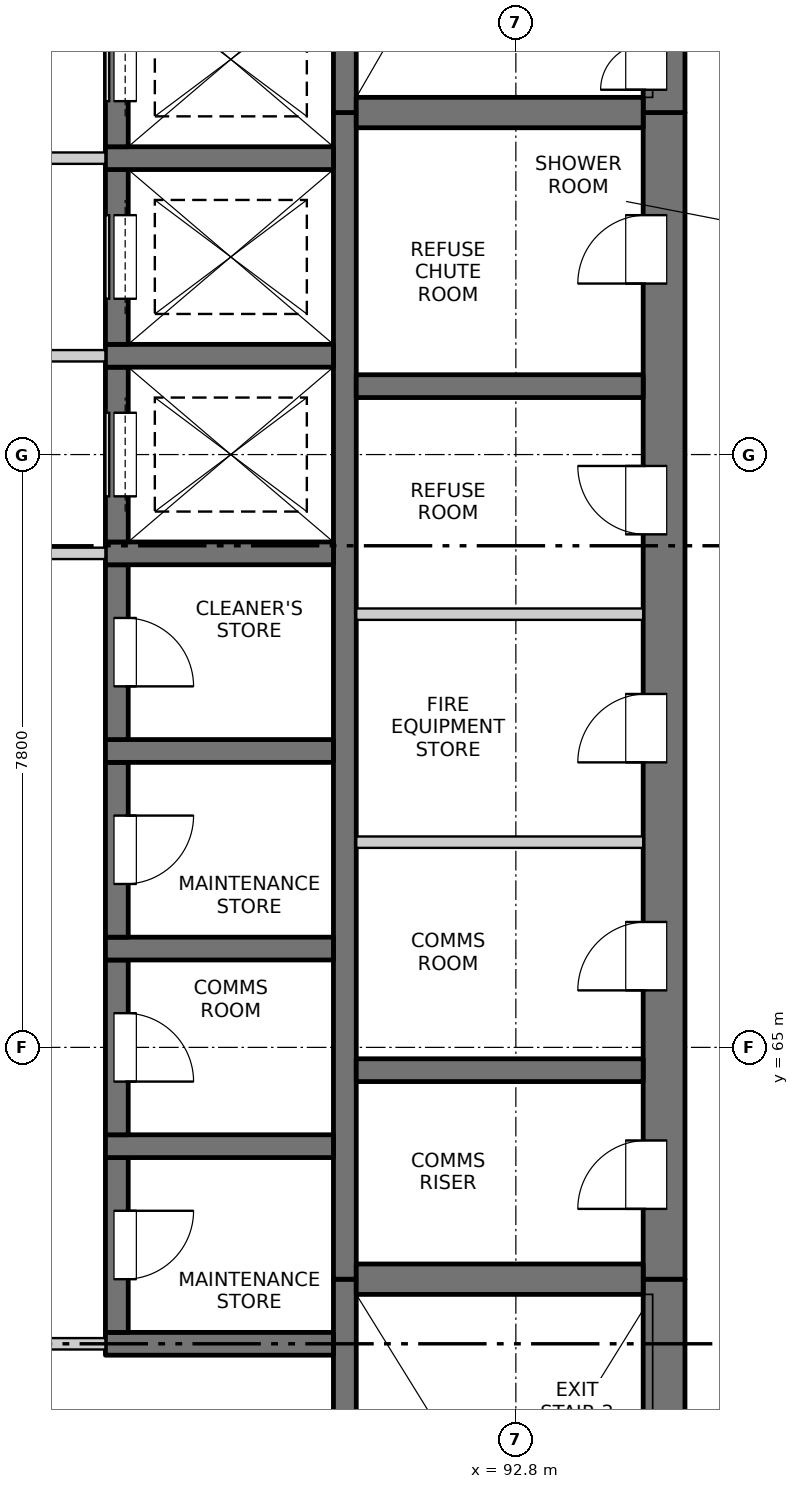
"""IFC4 building model, lengths in metres.
Left out: names, types, materials, properties, quantities, classifications, styles, units other than length and angle.
Written with IfcOpenShell. Run it as: python <this file> out.ifc"""

import sys

from ifc_helpers import new_model, si_unit, direction, frame, frame_2d, origin, place, context, subcontext, project, spatial, rectangle, extrude, element, fill, save


model = new_model("IFC4")
c1 = context("Model", 3, precision=1e-05, world=origin(), true_north=direction((0.0, 1.0)))
c2 = subcontext(c1, "Body", "Model", "MODEL_VIEW")
j1 = project(units=[si_unit("LENGTHUNIT", "METRE"), si_unit("PLANEANGLEUNIT", "RADIAN")], contexts=[c1])
p1 = place(None, origin())
s1 = spatial("IfcSite", under=j1, at=p1, CompositionType="ELEMENT")
p2 = place(p1, origin())
s2 = spatial("IfcBuilding", under=s1, at=p2, CompositionType="ELEMENT")
p3 = place(p2, frame((0.0, 0.0, 140.7)))
s3 = spatial("IfcBuildingStorey", under=s2, at=p3, CompositionType="ELEMENT", Elevation=140.7)
p4 = place(p3, frame((94.75, 54.975, -0.25), z_axis=(0.0, 0.0, 1.0), x_axis=(0.0, 1.0, 0.0)))
e1 = element("IfcWall", 1, at=p4, inside=s3, PredefinedType="SOLIDWALL", context=c2, shape_type="SweptSolid", body=[
    extrude(rectangle(XDim=6.975, YDim=0.55, at=frame_2d((3.487, 0.0))), origin(), (0.0, 0.0, 1.0), 3.35),
])
p5 = place(p4, frame((0.675, 0.0, 0.25)))
e2 = element("IfcOpeningElement", 2, at=p5, cuts=e1, PredefinedType="OPENING", context=c2, shape_type="SweptSolid", body=[
    extrude(rectangle(XDim=1.2, YDim=2.1, at=frame_2d((0.6, 1.05))), frame((0.0, 0.285, 0.0), z_axis=(0.0, -1.0, 0.0), x_axis=(1.0, 0.0, 0.0)), (0.0, 0.0, 1.0), 0.57),
])
p6 = place(p3, frame((94.75, 61.95, -0.25), z_axis=(0.0, 0.0, 1.0), x_axis=(0.0, 1.0, 0.0)))
e3 = element("IfcWall", 3, at=p6, inside=s3, PredefinedType="SOLIDWALL", context=c2, shape_type="SweptSolid", body=[
    extrude(rectangle(XDim=15.35, YDim=0.55, at=frame_2d((7.675, 0.0))), origin(), (0.0, 0.0, 1.0), 3.35),
])
p7 = place(p6, frame((0.925, 0.0, 0.25)))
e4 = element("IfcOpeningElement", 4, at=p7, cuts=e3, PredefinedType="OPENING", context=c2, shape_type="SweptSolid", body=[
    extrude(rectangle(XDim=0.9, YDim=2.1, at=frame_2d((0.45, 1.05))), frame((0.0, 0.285, 0.0), z_axis=(0.0, -1.0, 0.0), x_axis=(1.0, 0.0, 0.0)), (0.0, 0.0, 1.0), 0.57),
])
p8 = place(p6, frame((3.8, 0.0, 0.25)))
e5 = element("IfcOpeningElement", 5, at=p8, cuts=e3, PredefinedType="OPENING", context=c2, shape_type="SweptSolid", body=[
    extrude(rectangle(XDim=0.9, YDim=2.1, at=frame_2d((0.45, 1.05))), frame((0.0, 0.285, 0.0), z_axis=(0.0, -1.0, 0.0), x_axis=(1.0, 0.0, 0.0)), (0.0, 0.0, 1.0), 0.57),
])
p9 = place(p6, frame((6.8, 0.0, 0.25)))
e6 = element("IfcOpeningElement", 6, at=p9, cuts=e3, PredefinedType="OPENING", context=c2, shape_type="SweptSolid", body=[
    extrude(rectangle(XDim=0.9, YDim=2.1, at=frame_2d((0.45, 1.05))), frame((0.0, 0.285, 0.0), z_axis=(0.0, -1.0, 0.0), x_axis=(1.0, 0.0, 0.0)), (0.0, 0.0, 1.0), 0.57),
])
p10 = place(p6, frame((9.8, 0.0, 0.25)))
e7 = element("IfcOpeningElement", 7, at=p10, cuts=e3, PredefinedType="OPENING", context=c2, shape_type="SweptSolid", body=[
    extrude(rectangle(XDim=0.9, YDim=2.1, at=frame_2d((0.45, 1.05))), frame((0.0, 0.285, 0.0), z_axis=(0.0, -1.0, 0.0), x_axis=(1.0, 0.0, 0.0)), (0.0, 0.0, 1.0), 0.57),
])
p11 = place(p6, frame((13.1, 0.0, 0.25)))
e8 = element("IfcOpeningElement", 8, at=p11, cuts=e3, PredefinedType="OPENING", context=c2, shape_type="SweptSolid", body=[
    extrude(rectangle(XDim=0.9, YDim=2.1, at=frame_2d((0.45, 1.05))), frame((0.0, 0.285, 0.0), z_axis=(0.0, -1.0, 0.0), x_axis=(1.0, 0.0, 0.0)), (0.0, 0.0, 1.0), 0.57),
])
p12 = place(p3, frame((94.75, 77.3, -0.25), z_axis=(0.0, 0.0, 1.0), x_axis=(0.0, 1.0, 0.0)))
e9 = element("IfcWall", 9, at=p12, inside=s3, PredefinedType="SOLIDWALL", context=c2, shape_type="SweptSolid", body=[
    extrude(rectangle(XDim=7.475, YDim=0.55, at=frame_2d((3.737, 0.0))), origin(), (0.0, 0.0, 1.0), 3.35),
])
p13 = place(p12, frame((0.3, 0.0, 0.25)))
e10 = element("IfcOpeningElement", 10, at=p13, cuts=e9, PredefinedType="OPENING", context=c2, shape_type="SweptSolid", body=[
    extrude(rectangle(XDim=1.2, YDim=2.1, at=frame_2d((0.6, 1.05))), frame((0.0, 0.285, 0.0), z_axis=(0.0, -1.0, 0.0), x_axis=(1.0, 0.0, 0.0)), (0.0, 0.0, 1.0), 0.57),
])
p14 = place(p3, frame((90.55, 55.525, -0.25), z_axis=(0.0, 0.0, 1.0), x_axis=(0.0, 1.0, 0.0)))
e11 = element("IfcWall", 11, at=p14, inside=s3, PredefinedType="SOLIDWALL", context=c2, shape_type="SweptSolid", body=[
    extrude(rectangle(XDim=6.425, YDim=0.3, at=frame_2d((3.212, 0.0))), origin(), (0.0, 0.0, 1.0), 3.35),
])
p15 = place(p3, frame((90.55, 61.95, -0.25), z_axis=(0.0, 0.0, 1.0), x_axis=(0.0, 1.0, 0.0)))
e12 = element("IfcWall", 12, at=p15, inside=s3, PredefinedType="SOLIDWALL", context=c2, shape_type="SweptSolid", body=[
    extrude(rectangle(XDim=15.35, YDim=0.3, at=frame_2d((7.675, 0.0))), origin(), (0.0, 0.0, 1.0), 3.35),
])
p16 = place(p3, frame((90.55, 77.3, -0.25), z_axis=(0.0, 0.0, 1.0), x_axis=(0.0, 1.0, 0.0)))
e13 = element("IfcWall", 13, at=p16, inside=s3, PredefinedType="SOLIDWALL", context=c2, shape_type="SweptSolid", body=[
    extrude(rectangle(XDim=6.925, YDim=0.3, at=frame_2d((3.462, 0.0))), origin(), (0.0, 0.0, 1.0), 3.35),
])
p17 = place(p3, frame((87.4, 61.1, -0.25), z_axis=(0.0, 0.0, 1.0), x_axis=(1.0, 0.0, 0.0)))
e14 = element("IfcWall", 14, at=p17, inside=s3, PredefinedType="SOLIDWALL", context=c2, shape_type="SweptSolid", body=[
    extrude(rectangle(XDim=3.0, YDim=0.3, at=frame_2d((1.5, 0.0))), origin(), (0.0, 0.0, 1.0), 3.35),
])
p18 = place(p3, frame((87.55, 61.25, -0.25), z_axis=(0.0, 0.0, 1.0), x_axis=(0.0, 1.0, 0.0)))
e15 = element("IfcWall", 15, at=p18, inside=s3, PredefinedType="SOLIDWALL", context=c2, shape_type="SweptSolid", body=[
    extrude(rectangle(XDim=2.3, YDim=0.3, at=frame_2d((1.15, 0.0))), origin(), (0.0, 0.0, 1.0), 3.35),
])
p19 = place(p18, frame((0.7, 0.0, 0.25)))
e16 = element("IfcOpeningElement", 16, at=p19, cuts=e15, PredefinedType="OPENING", context=c2, shape_type="SweptSolid", body=[
    extrude(rectangle(XDim=0.9, YDim=2.1, at=frame_2d((0.45, 1.05))), frame((0.0, 0.16, 0.0), z_axis=(0.0, -1.0, 0.0), x_axis=(1.0, 0.0, 0.0)), (0.0, 0.0, 1.0), 0.32),
])
p20 = place(p3, frame((87.4, 63.7, -0.25), z_axis=(0.0, 0.0, 1.0), x_axis=(1.0, 0.0, 0.0)))
e17 = element("IfcWall", 17, at=p20, inside=s3, PredefinedType="SOLIDWALL", context=c2, shape_type="SweptSolid", body=[
    extrude(rectangle(XDim=3.0, YDim=0.3, at=frame_2d((1.5, 0.0))), origin(), (0.0, 0.0, 1.0), 3.35),
])
p21 = place(p3, frame((87.55, 63.85, -0.25), z_axis=(0.0, 0.0, 1.0), x_axis=(0.0, 1.0, 0.0)))
e18 = element("IfcWall", 18, at=p21, inside=s3, PredefinedType="SOLIDWALL", context=c2, shape_type="SweptSolid", body=[
    extrude(rectangle(XDim=2.3, YDim=0.3, at=frame_2d((1.15, 0.0))), origin(), (0.0, 0.0, 1.0), 3.35),
])
p22 = place(p21, frame((0.7, 0.0, 0.25)))
e19 = element("IfcOpeningElement", 19, at=p22, cuts=e18, PredefinedType="OPENING", context=c2, shape_type="SweptSolid", body=[
    extrude(rectangle(XDim=0.9, YDim=2.1, at=frame_2d((0.45, 1.05))), frame((0.0, 0.16, 0.0), z_axis=(0.0, -1.0, 0.0), x_axis=(1.0, 0.0, 0.0)), (0.0, 0.0, 1.0), 0.32),
])
p23 = place(p3, frame((87.4, 66.3, -0.25), z_axis=(0.0, 0.0, 1.0), x_axis=(1.0, 0.0, 0.0)))
e20 = element("IfcWall", 20, at=p23, inside=s3, PredefinedType="SOLIDWALL", context=c2, shape_type="SweptSolid", body=[
    extrude(rectangle(XDim=3.0, YDim=0.3, at=frame_2d((1.5, 0.0))), origin(), (0.0, 0.0, 1.0), 3.35),
])
p24 = place(p3, frame((87.55, 66.45, -0.25), z_axis=(0.0, 0.0, 1.0), x_axis=(0.0, 1.0, 0.0)))
e21 = element("IfcWall", 21, at=p24, inside=s3, PredefinedType="SOLIDWALL", context=c2, shape_type="SweptSolid", body=[
    extrude(rectangle(XDim=2.3, YDim=0.3, at=frame_2d((1.15, 0.0))), origin(), (0.0, 0.0, 1.0), 3.35),
])
p25 = place(p24, frame((0.7, 0.0, 0.25)))
e22 = element("IfcOpeningElement", 22, at=p25, cuts=e21, PredefinedType="OPENING", context=c2, shape_type="SweptSolid", body=[
    extrude(rectangle(XDim=0.9, YDim=2.1, at=frame_2d((0.45, 1.05))), frame((0.0, 0.16, 0.0), z_axis=(0.0, -1.0, 0.0), x_axis=(1.0, 0.0, 0.0)), (0.0, 0.0, 1.0), 0.32),
])
p26 = place(p3, frame((87.4, 68.9, -0.25), z_axis=(0.0, 0.0, 1.0), x_axis=(1.0, 0.0, 0.0)))
e23 = element("IfcWall", 23, at=p26, inside=s3, PredefinedType="SOLIDWALL", context=c2, shape_type="SweptSolid", body=[
    extrude(rectangle(XDim=3.0, YDim=0.3, at=frame_2d((1.5, 0.0))), origin(), (0.0, 0.0, 1.0), 3.35),
])
p27 = place(p3, frame((87.55, 69.05, -0.25), z_axis=(0.0, 0.0, 1.0), x_axis=(0.0, 1.0, 0.0)))
e24 = element("IfcWall", 24, at=p27, inside=s3, PredefinedType="SOLIDWALL", context=c2, shape_type="SweptSolid", body=[
    extrude(rectangle(XDim=2.3, YDim=0.3, at=frame_2d((1.15, 0.0))), origin(), (0.0, 0.0, 1.0), 3.35),
])
p28 = place(p27, frame((0.7, 0.0, 0.25)))
e25 = element("IfcOpeningElement", 25, at=p28, cuts=e24, PredefinedType="OPENING", context=c2, shape_type="SweptSolid", body=[
    extrude(rectangle(XDim=0.9, YDim=2.1, at=frame_2d((0.45, 1.05))), frame((0.0, 0.16, 0.0), z_axis=(0.0, -1.0, 0.0), x_axis=(1.0, 0.0, 0.0)), (0.0, 0.0, 1.0), 0.32),
])
p29 = place(p3, frame((87.4, 71.5, -0.25), z_axis=(0.0, 0.0, 1.0), x_axis=(1.0, 0.0, 0.0)))
e26 = element("IfcWall", 26, at=p29, inside=s3, PredefinedType="SOLIDWALL", context=c2, shape_type="SweptSolid", body=[
    extrude(rectangle(XDim=3.0, YDim=0.3, at=frame_2d((1.5, 0.0))), origin(), (0.0, 0.0, 1.0), 3.35),
])
p30 = place(p3, frame((87.55, 71.65, -0.25), z_axis=(0.0, 0.0, 1.0), x_axis=(0.0, 1.0, 0.0)))
e27 = element("IfcWall", 27, at=p30, inside=s3, PredefinedType="SOLIDWALL", context=c2, shape_type="SweptSolid", body=[
    extrude(rectangle(XDim=2.3, YDim=0.3, at=frame_2d((1.15, 0.0))), origin(), (0.0, 0.0, 1.0), 3.35),
])
p31 = place(p30, frame((0.6, 0.0, 0.25)))
e28 = element("IfcOpeningElement", 28, at=p31, cuts=e27, PredefinedType="OPENING", context=c2, shape_type="SweptSolid", body=[
    extrude(rectangle(XDim=1.1, YDim=2.1, at=frame_2d((0.55, 1.05))), frame((0.0, 0.16, 0.0), z_axis=(0.0, -1.0, 0.0), x_axis=(1.0, 0.0, 0.0)), (0.0, 0.0, 1.0), 0.32),
])
p32 = place(p3, frame((87.4, 74.1, -0.25), z_axis=(0.0, 0.0, 1.0), x_axis=(1.0, 0.0, 0.0)))
e29 = element("IfcWall", 29, at=p32, inside=s3, PredefinedType="SOLIDWALL", context=c2, shape_type="SweptSolid", body=[
    extrude(rectangle(XDim=3.0, YDim=0.3, at=frame_2d((1.5, 0.0))), origin(), (0.0, 0.0, 1.0), 3.35),
])
p33 = place(p3, frame((87.55, 74.25, -0.25), z_axis=(0.0, 0.0, 1.0), x_axis=(0.0, 1.0, 0.0)))
e30 = element("IfcWall", 30, at=p33, inside=s3, PredefinedType="SOLIDWALL", context=c2, shape_type="SweptSolid", body=[
    extrude(rectangle(XDim=2.3, YDim=0.3, at=frame_2d((1.15, 0.0))), origin(), (0.0, 0.0, 1.0), 3.35),
])
p34 = place(p33, frame((0.6, 0.0, 0.25)))
e31 = element("IfcOpeningElement", 31, at=p34, cuts=e30, PredefinedType="OPENING", context=c2, shape_type="SweptSolid", body=[
    extrude(rectangle(XDim=1.1, YDim=2.1, at=frame_2d((0.55, 1.05))), frame((0.0, 0.16, 0.0), z_axis=(0.0, -1.0, 0.0), x_axis=(1.0, 0.0, 0.0)), (0.0, 0.0, 1.0), 0.32),
])
p35 = place(p3, frame((87.4, 76.7, -0.25), z_axis=(0.0, 0.0, 1.0), x_axis=(1.0, 0.0, 0.0)))
e32 = element("IfcWall", 32, at=p35, inside=s3, PredefinedType="SOLIDWALL", context=c2, shape_type="SweptSolid", body=[
    extrude(rectangle(XDim=3.0, YDim=0.3, at=frame_2d((1.5, 0.0))), origin(), (0.0, 0.0, 1.0), 3.35),
])
p36 = place(p3, frame((87.55, 76.85, -0.25), z_axis=(0.0, 0.0, 1.0), x_axis=(0.0, 1.0, 0.0)))
e33 = element("IfcWall", 33, at=p36, inside=s3, PredefinedType="SOLIDWALL", context=c2, shape_type="SweptSolid", body=[
    extrude(rectangle(XDim=2.3, YDim=0.3, at=frame_2d((1.15, 0.0))), origin(), (0.0, 0.0, 1.0), 3.35),
])
p37 = place(p36, frame((0.6, 0.0, 0.25)))
e34 = element("IfcOpeningElement", 34, at=p37, cuts=e33, PredefinedType="OPENING", context=c2, shape_type="SweptSolid", body=[
    extrude(rectangle(XDim=1.1, YDim=2.1, at=frame_2d((0.55, 1.05))), frame((0.0, 0.16, 0.0), z_axis=(0.0, -1.0, 0.0), x_axis=(1.0, 0.0, 0.0)), (0.0, 0.0, 1.0), 0.32),
])
p38 = place(p3, frame((90.7, 61.95, -0.25), z_axis=(0.0, 0.0, 1.0), x_axis=(1.0, 0.0, 0.0)))
e35 = element("IfcWall", 35, at=p38, inside=s3, PredefinedType="SOLIDWALL", context=c2, shape_type="SweptSolid", body=[
    extrude(rectangle(XDim=3.775, YDim=0.4, at=frame_2d((1.888, 0.0))), origin(), (0.0, 0.0, 1.0), 3.35),
])
for number, where, z_axis, x_axis in (
    (36, (90.7, 64.7, -0.25), (0.0, 0.0, 1.0), (1.0, 0.0, 0.0)),
    (37, (90.7, 73.7, -0.25), (0.0, 0.0, 1.0), (1.0, 0.0, 0.0)),
):
    element("IfcWall", number, at=place(p3, frame(where, z_axis=z_axis, x_axis=x_axis)), inside=s3, PredefinedType="SOLIDWALL", context=c2, shape_type="SweptSolid", body=[
        extrude(rectangle(XDim=3.775, YDim=0.3, at=frame_2d((1.888, 0.0))), origin(), (0.0, 0.0, 1.0), 3.35),
    ])
p39 = place(p3, frame((90.7, 77.3, -0.25), z_axis=(0.0, 0.0, 1.0), x_axis=(1.0, 0.0, 0.0)))
e38 = element("IfcWall", 38, at=p39, inside=s3, PredefinedType="SOLIDWALL", context=c2, shape_type="SweptSolid", body=[
    extrude(rectangle(XDim=3.775, YDim=0.4, at=frame_2d((1.888, 0.0))), origin(), (0.0, 0.0, 1.0), 3.35),
])
p40 = place(p3, frame((82.6, 61.1, 0.0), z_axis=(0.0, 0.0, 1.0), x_axis=(1.0, 0.0, 0.0)))
e39 = element("IfcWall", 39, at=p40, inside=s3, PredefinedType="PARTITIONING", context=c2, shape_type="SweptSolid", body=[
    extrude(rectangle(XDim=4.8, YDim=0.15, at=frame_2d((2.4, 0.0))), origin(), (0.0, 0.0, 1.0), 3.1),
])
p41 = place(p40, frame((1.5, 0.0, 0.0)))
e40 = element("IfcOpeningElement", 40, at=p41, cuts=e39, PredefinedType="OPENING", context=c2, shape_type="SweptSolid", body=[
    extrude(rectangle(XDim=1.8, YDim=2.1, at=frame_2d((0.9, 1.05))), frame((0.0, 0.085, 0.0), z_axis=(0.0, -1.0, 0.0), x_axis=(1.0, 0.0, 0.0)), (0.0, 0.0, 1.0), 0.17),
])
for number, where, z_axis, x_axis in (
    (41, (90.7, 67.7, 0.0), (0.0, 0.0, 1.0), (1.0, 0.0, 0.0)),
    (42, (90.7, 70.7, 0.0), (0.0, 0.0, 1.0), (1.0, 0.0, 0.0)),
):
    element("IfcWall", number, at=place(p3, frame(where, z_axis=z_axis, x_axis=x_axis)), inside=s3, PredefinedType="PARTITIONING", context=c2, shape_type="SweptSolid", body=[
        extrude(rectangle(XDim=3.775, YDim=0.15, at=frame_2d((1.887, 0.0))), origin(), (0.0, 0.0, 1.0), 3.1),
    ])
p42 = place(p3, frame((82.6, 71.5, 0.0), z_axis=(0.0, 0.0, 1.0), x_axis=(1.0, 0.0, 0.0)))
e43 = element("IfcWall", 43, at=p42, inside=s3, PredefinedType="PARTITIONING", context=c2, shape_type="SweptSolid", body=[
    extrude(rectangle(XDim=4.8, YDim=0.15, at=frame_2d((2.4, 0.0))), origin(), (0.0, 0.0, 1.0), 3.1),
])
p43 = place(p42, frame((1.5, 0.0, 0.0)))
e44 = element("IfcOpeningElement", 44, at=p43, cuts=e43, PredefinedType="OPENING", context=c2, shape_type="SweptSolid", body=[
    extrude(rectangle(XDim=1.8, YDim=2.1, at=frame_2d((0.9, 1.05))), frame((0.0, 0.085, 0.0), z_axis=(0.0, -1.0, 0.0), x_axis=(1.0, 0.0, 0.0)), (0.0, 0.0, 1.0), 0.17),
])
p44 = place(p3, frame((82.6, 74.1, 0.0), z_axis=(0.0, 0.0, 1.0), x_axis=(1.0, 0.0, 0.0)))
e45 = element("IfcWall", 45, at=p44, inside=s3, PredefinedType="PARTITIONING", context=c2, shape_type="SweptSolid", body=[
    extrude(rectangle(XDim=4.8, YDim=0.15, at=frame_2d((2.4, 0.0))), origin(), (0.0, 0.0, 1.0), 3.1),
])
p45 = place(p44, frame((1.5, 0.0, 0.0)))
e46 = element("IfcOpeningElement", 46, at=p45, cuts=e45, PredefinedType="OPENING", context=c2, shape_type="SweptSolid", body=[
    extrude(rectangle(XDim=1.8, YDim=2.1, at=frame_2d((0.9, 1.05))), frame((0.0, 0.085, 0.0), z_axis=(0.0, -1.0, 0.0), x_axis=(1.0, 0.0, 0.0)), (0.0, 0.0, 1.0), 0.17),
])
p46 = place(p3, frame((82.6, 76.7, 0.0), z_axis=(0.0, 0.0, 1.0), x_axis=(1.0, 0.0, 0.0)))
e47 = element("IfcWall", 47, at=p46, inside=s3, PredefinedType="PARTITIONING", context=c2, shape_type="SweptSolid", body=[
    extrude(rectangle(XDim=4.8, YDim=0.15, at=frame_2d((2.4, 0.0))), origin(), (0.0, 0.0, 1.0), 3.1),
])
p47 = place(p46, frame((1.5, 0.0, 0.0)))
e48 = element("IfcOpeningElement", 48, at=p47, cuts=e47, PredefinedType="OPENING", context=c2, shape_type="SweptSolid", body=[
    extrude(rectangle(XDim=1.8, YDim=2.1, at=frame_2d((0.9, 1.05))), frame((0.0, 0.085, 0.0), z_axis=(0.0, -1.0, 0.0), x_axis=(1.0, 0.0, 0.0)), (0.0, 0.0, 1.0), 0.17),
])
p48 = place(p19, origin())
e49 = element("IfcDoor", 49, at=p48, inside=s3, OperationType="SINGLE_SWING_LEFT", PredefinedType="DOOR", context=c2, shape_type="SweptSolid", body=[
    extrude(rectangle(XDim=0.9, YDim=2.1, at=frame_2d((0.45, 1.05))), frame((0.0, -0.085, 0.0), z_axis=(0.0, -1.0, 0.0), x_axis=(1.0, 0.0, 0.0)), (0.0, 0.0, 1.0), 0.05),
])
fill(e16, e49)
p49 = place(p7, origin())
e50 = element("IfcDoor", 50, at=p49, inside=s3, OperationType="SINGLE_SWING_LEFT", PredefinedType="DOOR", context=c2, shape_type="SweptSolid", body=[
    extrude(rectangle(XDim=0.9, YDim=2.1, at=frame_2d((0.45, 1.05))), frame((0.0, 0.26, 0.0), z_axis=(0.0, -1.0, 0.0), x_axis=(1.0, 0.0, 0.0)), (0.0, 0.0, 1.0), 0.05),
])
fill(e4, e50)
p50 = place(p22, origin())
e51 = element("IfcDoor", 51, at=p50, inside=s3, OperationType="SINGLE_SWING_RIGHT", PredefinedType="DOOR", context=c2, shape_type="SweptSolid", body=[
    extrude(rectangle(XDim=0.9, YDim=2.1, at=frame_2d((0.45, 1.05))), frame((0.0, -0.085, 0.0), z_axis=(0.0, -1.0, 0.0), x_axis=(1.0, 0.0, 0.0)), (0.0, 0.0, 1.0), 0.05),
])
fill(e19, e51)
p51 = place(p8, origin())
e52 = element("IfcDoor", 52, at=p51, inside=s3, OperationType="SINGLE_SWING_LEFT", PredefinedType="DOOR", context=c2, shape_type="SweptSolid", body=[
    extrude(rectangle(XDim=0.9, YDim=2.1, at=frame_2d((0.45, 1.05))), frame((0.0, 0.26, 0.0), z_axis=(0.0, -1.0, 0.0), x_axis=(1.0, 0.0, 0.0)), (0.0, 0.0, 1.0), 0.05),
])
fill(e5, e52)
p52 = place(p25, origin())
e53 = element("IfcDoor", 53, at=p52, inside=s3, OperationType="SINGLE_SWING_LEFT", PredefinedType="DOOR", context=c2, shape_type="SweptSolid", body=[
    extrude(rectangle(XDim=0.9, YDim=2.1, at=frame_2d((0.45, 1.05))), frame((0.0, -0.085, 0.0), z_axis=(0.0, -1.0, 0.0), x_axis=(1.0, 0.0, 0.0)), (0.0, 0.0, 1.0), 0.05),
])
fill(e22, e53)
p53 = place(p9, origin())
e54 = element("IfcDoor", 54, at=p53, inside=s3, OperationType="SINGLE_SWING_LEFT", PredefinedType="DOOR", context=c2, shape_type="SweptSolid", body=[
    extrude(rectangle(XDim=0.9, YDim=2.1, at=frame_2d((0.45, 1.05))), frame((0.0, 0.26, 0.0), z_axis=(0.0, -1.0, 0.0), x_axis=(1.0, 0.0, 0.0)), (0.0, 0.0, 1.0), 0.05),
])
fill(e6, e54)
p54 = place(p28, origin())
e55 = element("IfcDoor", 55, at=p54, inside=s3, OperationType="SINGLE_SWING_RIGHT", PredefinedType="DOOR", context=c2, shape_type="SweptSolid", body=[
    extrude(rectangle(XDim=0.9, YDim=2.1, at=frame_2d((0.45, 1.05))), frame((0.0, -0.085, 0.0), z_axis=(0.0, -1.0, 0.0), x_axis=(1.0, 0.0, 0.0)), (0.0, 0.0, 1.0), 0.05),
])
fill(e25, e55)
p55 = place(p10, origin())
e56 = element("IfcDoor", 56, at=p55, inside=s3, OperationType="SINGLE_SWING_RIGHT", PredefinedType="DOOR", context=c2, shape_type="SweptSolid", body=[
    extrude(rectangle(XDim=0.9, YDim=2.1, at=frame_2d((0.45, 1.05))), frame((0.0, 0.26, 0.0), z_axis=(0.0, -1.0, 0.0), x_axis=(1.0, 0.0, 0.0)), (0.0, 0.0, 1.0), 0.05),
])
fill(e7, e56)
p56 = place(p31, origin())
e57 = element("IfcDoor", 57, at=p56, inside=s3, OperationType="SLIDING_TO_LEFT", PredefinedType="DOOR", context=c2, shape_type="SweptSolid", body=[
    extrude(rectangle(XDim=1.1, YDim=2.1, at=frame_2d((0.55, 1.05))), frame((0.0, -0.085, 0.0), z_axis=(0.0, -1.0, 0.0), x_axis=(1.0, 0.0, 0.0)), (0.0, 0.0, 1.0), 0.05),
])
fill(e28, e57)
p57 = place(p34, origin())
e58 = element("IfcDoor", 58, at=p57, inside=s3, OperationType="SLIDING_TO_LEFT", PredefinedType="DOOR", context=c2, shape_type="SweptSolid", body=[
    extrude(rectangle(XDim=1.1, YDim=2.1, at=frame_2d((0.55, 1.05))), frame((0.0, -0.085, 0.0), z_axis=(0.0, -1.0, 0.0), x_axis=(1.0, 0.0, 0.0)), (0.0, 0.0, 1.0), 0.05),
])
fill(e31, e58)
p58 = place(p11, origin())
e59 = element("IfcDoor", 59, at=p58, inside=s3, OperationType="SINGLE_SWING_LEFT", PredefinedType="DOOR", context=c2, shape_type="SweptSolid", body=[
    extrude(rectangle(XDim=0.9, YDim=2.1, at=frame_2d((0.45, 1.05))), frame((0.0, 0.26, 0.0), z_axis=(0.0, -1.0, 0.0), x_axis=(1.0, 0.0, 0.0)), (0.0, 0.0, 1.0), 0.05),
])
fill(e8, e59)
p59 = place(p37, origin())
e60 = element("IfcDoor", 60, at=p59, inside=s3, OperationType="SLIDING_TO_LEFT", PredefinedType="DOOR", context=c2, shape_type="SweptSolid", body=[
    extrude(rectangle(XDim=1.1, YDim=2.1, at=frame_2d((0.55, 1.05))), frame((0.0, -0.085, 0.0), z_axis=(0.0, -1.0, 0.0), x_axis=(1.0, 0.0, 0.0)), (0.0, 0.0, 1.0), 0.05),
])
fill(e34, e60)
p60 = place(p13, origin())
e61 = element("IfcDoor", 61, at=p60, inside=s3, OperationType="DOUBLE_DOOR_SINGLE_SWING", PredefinedType="DOOR", context=c2, shape_type="SweptSolid", body=[
    extrude(rectangle(XDim=1.2, YDim=2.1, at=frame_2d((0.6, 1.05))), frame((0.0, 0.26, 0.0), z_axis=(0.0, -1.0, 0.0), x_axis=(1.0, 0.0, 0.0)), (0.0, 0.0, 1.0), 0.05),
])
fill(e10, e61)
save(model, sys.argv[1])
